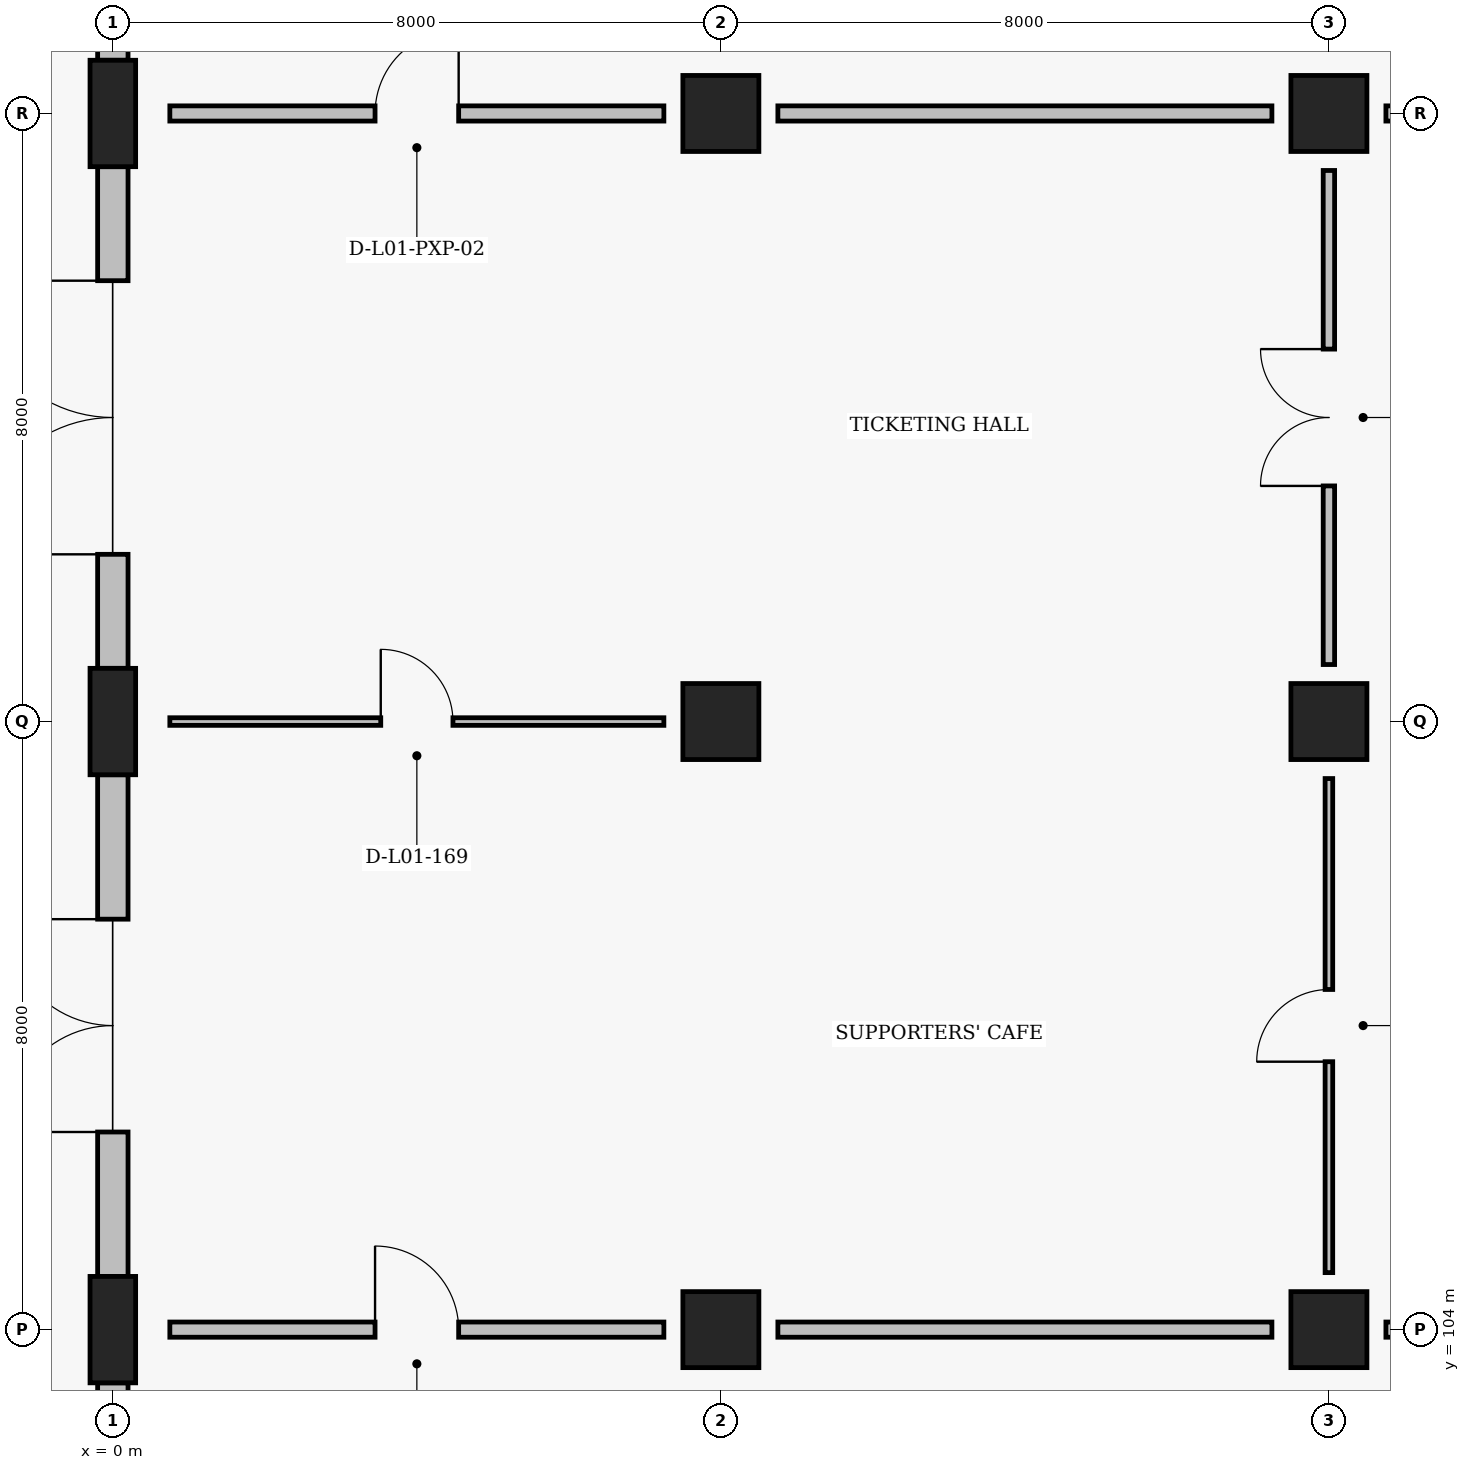
"""IFC4 building model, lengths in metres.
Left out: names, types, materials, properties, quantities, classifications, styles, units other than length and angle.
Written with IfcOpenShell. Run it as: python <this file> out.ifc"""

import sys

from ifc_helpers import new_model, si_unit, direction, frame, frame_2d, origin, origin_2d, place, context, subcontext, project, spatial, rectangle, circle, extrude, element, fill, save


model = new_model("IFC4")
c1 = context("Model", 3, precision=1e-05, world=origin(), true_north=direction((0.0, 1.0)))
c2 = subcontext(c1, "Body", "Model", "MODEL_VIEW")
j1 = project(units=[si_unit("LENGTHUNIT", "METRE"), si_unit("PLANEANGLEUNIT", "RADIAN")], contexts=[c1])
p1 = place(None, origin())
s1 = spatial("IfcSite", under=j1, at=p1, CompositionType="ELEMENT")
p2 = place(p1, origin())
s2 = spatial("IfcBuilding", under=s1, at=p2, CompositionType="ELEMENT")
p3 = place(p2, origin())
s3 = spatial("IfcBuildingStorey", under=s2, at=p3, CompositionType="ELEMENT", Elevation=0.0)
for number, where, z_axis, x_axis in (
    (1, (0.0, 104.0, 0.0), (0.0, 0.0, 1.0), (1.0, 0.0, 0.0)),
    (2, (0.0, 112.0, 0.0), (0.0, 0.0, 1.0), (1.0, 0.0, 0.0)),
    (3, (0.0, 120.0, 0.0), (0.0, 0.0, 1.0), (1.0, 0.0, 0.0)),
):
    element("IfcColumn", number, at=place(p3, frame(where, z_axis=z_axis, x_axis=x_axis)), inside=s3, PredefinedType="PILASTER", context=c2, shape_type="SweptSolid", body=[
        extrude(rectangle(XDim=0.6, YDim=1.4, at=origin_2d()), origin(), (0.0, 0.0, 1.0), 4.8),
    ])
for number, where, z_axis, x_axis in (
    (4, (8.0, 104.0, 0.0), (0.0, 0.0, 1.0), (1.0, 0.0, 0.0)),
    (5, (8.0, 112.0, 0.0), (0.0, 0.0, 1.0), (1.0, 0.0, 0.0)),
    (6, (8.0, 120.0, 0.0), (0.0, 0.0, 1.0), (1.0, 0.0, 0.0)),
    (7, (16.0, 104.0, 0.0), (0.0, 0.0, 1.0), (1.0, 0.0, 0.0)),
    (8, (16.0, 112.0, 0.0), (0.0, 0.0, 1.0), (1.0, 0.0, 0.0)),
    (9, (16.0, 120.0, 0.0), (0.0, 0.0, 1.0), (1.0, 0.0, 0.0)),
):
    element("IfcColumn", number, at=place(p3, frame(where, z_axis=z_axis, x_axis=x_axis)), inside=s3, PredefinedType="COLUMN", context=c2, shape_type="SweptSolid", body=[
        extrude(circle(Radius=0.5, at=origin_2d()), origin(), (0.0, 0.0, 1.0), 4.8),
    ])
p4 = place(p3, frame((0.0, 96.7, 0.0), z_axis=(0.0, 0.0, 1.0), x_axis=(0.0, 1.0, 0.0)))
e10 = element("IfcWall", 10, at=p4, inside=s3, PredefinedType="SOLIDWALL", context=c2, shape_type="SweptSolid", body=[
    extrude(rectangle(XDim=6.6, YDim=0.4, at=frame_2d((3.3, 0.0))), origin(), (0.0, 0.0, 1.0), 3.91),
])
p5 = place(p4, frame((2.6, 0.0, 0.0)))
e11 = element("IfcOpeningElement", 11, at=p5, cuts=e10, PredefinedType="OPENING", context=c2, shape_type="SweptSolid", body=[
    extrude(rectangle(XDim=1.4, YDim=2.2, at=frame_2d((0.7, 1.1))), frame((0.0, 0.21, 0.0), z_axis=(0.0, -1.0, 0.0), x_axis=(1.0, 0.0, 0.0)), (0.0, 0.0, 1.0), 0.42),
])
p6 = place(p3, frame((0.0, 104.7, 0.0), z_axis=(0.0, 0.0, 1.0), x_axis=(0.0, 1.0, 0.0)))
e12 = element("IfcWall", 12, at=p6, inside=s3, PredefinedType="SOLIDWALL", context=c2, shape_type="SweptSolid", body=[
    extrude(rectangle(XDim=6.6, YDim=0.4, at=frame_2d((3.3, 0.0))), origin(), (0.0, 0.0, 1.0), 3.91),
])
p7 = place(p6, frame((1.9, 0.0, 0.0)))
e13 = element("IfcOpeningElement", 13, at=p7, cuts=e12, PredefinedType="OPENING", context=c2, shape_type="SweptSolid", body=[
    extrude(rectangle(XDim=2.8, YDim=2.55, at=frame_2d((1.4, 1.275))), frame((0.0, 0.21, 0.0), z_axis=(0.0, -1.0, 0.0), x_axis=(1.0, 0.0, 0.0)), (0.0, 0.0, 1.0), 0.42),
])
p8 = place(p3, frame((0.0, 112.7, 0.0), z_axis=(0.0, 0.0, 1.0), x_axis=(0.0, 1.0, 0.0)))
e14 = element("IfcWall", 14, at=p8, inside=s3, PredefinedType="SOLIDWALL", context=c2, shape_type="SweptSolid", body=[
    extrude(rectangle(XDim=6.6, YDim=0.4, at=frame_2d((3.3, 0.0))), origin(), (0.0, 0.0, 1.0), 3.66),
])
p9 = place(p8, frame((1.5, 0.0, 0.0)))
e15 = element("IfcOpeningElement", 15, at=p9, cuts=e14, PredefinedType="OPENING", context=c2, shape_type="SweptSolid", body=[
    extrude(rectangle(XDim=3.6, YDim=2.8, at=frame_2d((1.8, 1.4))), frame((0.0, 0.21, 0.0), z_axis=(0.0, -1.0, 0.0), x_axis=(1.0, 0.0, 0.0)), (0.0, 0.0, 1.0), 0.42),
])
p10 = place(p3, frame((0.0, 120.7, 0.0), z_axis=(0.0, 0.0, 1.0), x_axis=(0.0, 1.0, 0.0)))
e16 = element("IfcWall", 16, at=p10, inside=s3, PredefinedType="SOLIDWALL", context=c2, shape_type="SweptSolid", body=[
    extrude(rectangle(XDim=6.6, YDim=0.4, at=frame_2d((3.3, 0.0))), origin(), (0.0, 0.0, 1.0), 3.66),
])
p11 = place(p10, frame((2.6, 0.0, 0.0)))
e17 = element("IfcOpeningElement", 17, at=p11, cuts=e16, PredefinedType="OPENING", context=c2, shape_type="SweptSolid", body=[
    extrude(rectangle(XDim=1.4, YDim=2.2, at=frame_2d((0.7, 1.1))), frame((0.0, 0.21, 0.0), z_axis=(0.0, -1.0, 0.0), x_axis=(1.0, 0.0, 0.0)), (0.0, 0.0, 1.0), 0.42),
])
p12 = place(p3, frame((0.75, 120.0, 0.0), z_axis=(0.0, 0.0, 1.0), x_axis=(1.0, 0.0, 0.0)))
e18 = element("IfcWall", 18, at=p12, inside=s3, PredefinedType="PARTITIONING", context=c2, shape_type="SweptSolid", body=[
    extrude(rectangle(XDim=6.5, YDim=0.2, at=frame_2d((3.25, 0.0))), origin(), (0.0, 0.0, 1.0), 3.66),
])
p13 = place(p12, frame((2.7, 0.0, 0.0)))
e19 = element("IfcOpeningElement", 19, at=p13, cuts=e18, PredefinedType="OPENING", context=c2, shape_type="SweptSolid", body=[
    extrude(rectangle(XDim=1.1, YDim=2.2, at=frame_2d((0.55, 1.1))), frame((0.0, 0.11, 0.0), z_axis=(0.0, -1.0, 0.0), x_axis=(1.0, 0.0, 0.0)), (0.0, 0.0, 1.0), 0.22),
])
for number, where, z_axis, x_axis in (
    (20, (8.75, 120.0, 0.0), (0.0, 0.0, 1.0), (1.0, 0.0, 0.0)),
    (21, (16.75, 120.0, 0.0), (0.0, 0.0, 1.0), (1.0, 0.0, 0.0)),
):
    element("IfcWall", number, at=place(p3, frame(where, z_axis=z_axis, x_axis=x_axis)), inside=s3, PredefinedType="PARTITIONING", context=c2, shape_type="SweptSolid", body=[
        extrude(rectangle(XDim=6.5, YDim=0.2, at=frame_2d((3.25, 0.0))), origin(), (0.0, 0.0, 1.0), 3.91),
    ])
p14 = place(p3, frame((0.75, 104.0, 0.0), z_axis=(0.0, 0.0, 1.0), x_axis=(1.0, 0.0, 0.0)))
e22 = element("IfcWall", 22, at=p14, inside=s3, PredefinedType="PARTITIONING", context=c2, shape_type="SweptSolid", body=[
    extrude(rectangle(XDim=6.5, YDim=0.2, at=frame_2d((3.25, 0.0))), origin(), (0.0, 0.0, 1.0), 3.91),
])
p15 = place(p14, frame((2.7, 0.0, 0.0)))
e23 = element("IfcOpeningElement", 23, at=p15, cuts=e22, PredefinedType="OPENING", context=c2, shape_type="SweptSolid", body=[
    extrude(rectangle(XDim=1.1, YDim=2.2, at=frame_2d((0.55, 1.1))), frame((0.0, 0.11, 0.0), z_axis=(0.0, -1.0, 0.0), x_axis=(1.0, 0.0, 0.0)), (0.0, 0.0, 1.0), 0.22),
])
p16 = place(p3, frame((8.75, 104.0, 0.0), z_axis=(0.0, 0.0, 1.0), x_axis=(1.0, 0.0, 0.0)))
e24 = element("IfcWall", 24, at=p16, inside=s3, PredefinedType="PARTITIONING", context=c2, shape_type="SweptSolid", body=[
    extrude(rectangle(XDim=6.5, YDim=0.2, at=frame_2d((3.25, 0.0))), origin(), (0.0, 0.0, 1.0), 3.91),
])
p17 = place(p3, frame((16.75, 104.0, 0.0), z_axis=(0.0, 0.0, 1.0), x_axis=(1.0, 0.0, 0.0)))
e25 = element("IfcWall", 25, at=p17, inside=s3, PredefinedType="PARTITIONING", context=c2, shape_type="SweptSolid", body=[
    extrude(rectangle(XDim=6.5, YDim=0.2, at=frame_2d((3.25, 0.0))), origin(), (0.0, 0.0, 1.0), 3.66),
])
p18 = place(p3, frame((0.75, 112.0, 0.0), z_axis=(0.0, 0.0, 1.0), x_axis=(1.0, 0.0, 0.0)))
e26 = element("IfcWall", 26, at=p18, inside=s3, PredefinedType="PARTITIONING", context=c2, shape_type="SweptSolid", body=[
    extrude(rectangle(XDim=6.5, YDim=0.1, at=frame_2d((3.25, 0.0))), origin(), (0.0, 0.0, 1.0), 3.91),
])
p19 = place(p18, frame((2.775, 0.0, 0.0)))
e27 = element("IfcOpeningElement", 27, at=p19, cuts=e26, PredefinedType="OPENING", context=c2, shape_type="SweptSolid", body=[
    extrude(rectangle(XDim=0.95, YDim=2.1, at=frame_2d((0.475, 1.05))), frame((0.0, 0.06, 0.0), z_axis=(0.0, -1.0, 0.0), x_axis=(1.0, 0.0, 0.0)), (0.0, 0.0, 1.0), 0.12),
])
p20 = place(p3, frame((16.0, 112.75, 0.0), z_axis=(0.0, 0.0, 1.0), x_axis=(0.0, 1.0, 0.0)))
e28 = element("IfcWall", 28, at=p20, inside=s3, PredefinedType="PARTITIONING", context=c2, shape_type="SweptSolid", body=[
    extrude(rectangle(XDim=6.5, YDim=0.15, at=frame_2d((3.25, 0.0))), origin(), (0.0, 0.0, 1.0), 3.81),
])
p21 = place(p20, frame((2.35, 0.0, 0.0)))
e29 = element("IfcOpeningElement", 29, at=p21, cuts=e28, PredefinedType="OPENING", context=c2, shape_type="SweptSolid", body=[
    extrude(rectangle(XDim=1.8, YDim=2.3, at=frame_2d((0.9, 1.15))), frame((0.0, 0.085, 0.0), z_axis=(0.0, -1.0, 0.0), x_axis=(1.0, 0.0, 0.0)), (0.0, 0.0, 1.0), 0.17),
])
p22 = place(p3, frame((16.0, 104.75, 0.0), z_axis=(0.0, 0.0, 1.0), x_axis=(0.0, 1.0, 0.0)))
e30 = element("IfcWall", 30, at=p22, inside=s3, PredefinedType="PARTITIONING", context=c2, shape_type="SweptSolid", body=[
    extrude(rectangle(XDim=6.5, YDim=0.1, at=frame_2d((3.25, 0.0))), origin(), (0.0, 0.0, 1.0), 3.81),
])
p23 = place(p22, frame((2.775, 0.0, 0.0)))
e31 = element("IfcOpeningElement", 31, at=p23, cuts=e30, PredefinedType="OPENING", context=c2, shape_type="SweptSolid", body=[
    extrude(rectangle(XDim=0.95, YDim=2.1, at=frame_2d((0.475, 1.05))), frame((0.0, 0.06, 0.0), z_axis=(0.0, -1.0, 0.0), x_axis=(1.0, 0.0, 0.0)), (0.0, 0.0, 1.0), 0.12),
])
p24 = place(p7, origin())
e32 = element("IfcDoor", 32, at=p24, inside=s3, OperationType="DOUBLE_SWING_LEFT", PredefinedType="DOOR", context=c2, shape_type="SweptSolid", body=[
    extrude(rectangle(XDim=2.8, YDim=2.55, at=frame_2d((1.4, 1.275))), frame((0.0, 0.025, 0.0), z_axis=(0.0, -1.0, 0.0), x_axis=(1.0, 0.0, 0.0)), (0.0, 0.0, 1.0), 0.05),
])
fill(e13, e32)
p25 = place(p9, origin())
e33 = element("IfcDoor", 33, at=p25, inside=s3, OperationType="DOUBLE_SWING_LEFT", PredefinedType="DOOR", context=c2, shape_type="SweptSolid", body=[
    extrude(rectangle(XDim=3.6, YDim=2.8, at=frame_2d((1.8, 1.4))), frame((0.0, 0.025, 0.0), z_axis=(0.0, -1.0, 0.0), x_axis=(1.0, 0.0, 0.0)), (0.0, 0.0, 1.0), 0.05),
])
fill(e15, e33)
p26 = place(p13, origin())
e34 = element("IfcDoor", 34, at=p26, inside=s3, OperationType="SINGLE_SWING_RIGHT", PredefinedType="DOOR", context=c2, shape_type="SweptSolid", body=[
    extrude(rectangle(XDim=1.1, YDim=2.2, at=frame_2d((0.55, 1.1))), frame((0.0, 0.025, 0.0), z_axis=(0.0, -1.0, 0.0), x_axis=(1.0, 0.0, 0.0)), (0.0, 0.0, 1.0), 0.05),
])
fill(e19, e34)
p27 = place(p15, origin())
e35 = element("IfcDoor", 35, at=p27, inside=s3, OperationType="SINGLE_SWING_LEFT", PredefinedType="DOOR", context=c2, shape_type="SweptSolid", body=[
    extrude(rectangle(XDim=1.1, YDim=2.2, at=frame_2d((0.55, 1.1))), frame((0.0, 0.025, 0.0), z_axis=(0.0, -1.0, 0.0), x_axis=(1.0, 0.0, 0.0)), (0.0, 0.0, 1.0), 0.05),
])
fill(e23, e35)
p28 = place(p19, origin())
e36 = element("IfcDoor", 36, at=p28, inside=s3, OperationType="SINGLE_SWING_LEFT", PredefinedType="DOOR", context=c2, shape_type="SweptSolid", body=[
    extrude(rectangle(XDim=0.95, YDim=2.1, at=frame_2d((0.475, 1.05))), frame((0.0, 0.025, 0.0), z_axis=(0.0, -1.0, 0.0), x_axis=(1.0, 0.0, 0.0)), (0.0, 0.0, 1.0), 0.05),
])
fill(e27, e36)
p29 = place(p21, origin())
e37 = element("IfcDoor", 37, at=p29, inside=s3, OperationType="DOUBLE_SWING_LEFT", PredefinedType="DOOR", context=c2, shape_type="SweptSolid", body=[
    extrude(rectangle(XDim=1.8, YDim=2.3, at=frame_2d((0.9, 1.15))), frame((0.0, 0.025, 0.0), z_axis=(0.0, -1.0, 0.0), x_axis=(1.0, 0.0, 0.0)), (0.0, 0.0, 1.0), 0.05),
])
fill(e29, e37)
p30 = place(p23, origin())
e38 = element("IfcDoor", 38, at=p30, inside=s3, OperationType="SINGLE_SWING_LEFT", PredefinedType="DOOR", context=c2, shape_type="SweptSolid", body=[
    extrude(rectangle(XDim=0.95, YDim=2.1, at=frame_2d((0.475, 1.05))), frame((0.0, 0.025, 0.0), z_axis=(0.0, -1.0, 0.0), x_axis=(1.0, 0.0, 0.0)), (0.0, 0.0, 1.0), 0.05),
])
fill(e31, e38)
save(model, sys.argv[1])
